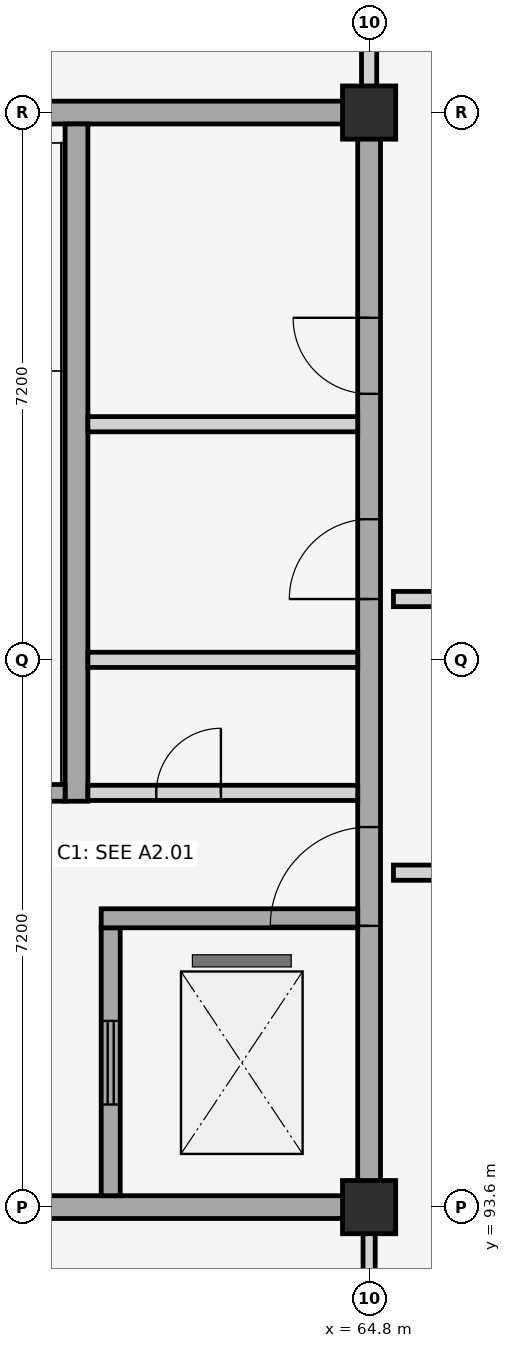
"""IFC4 building model, lengths in metres.
Left out: names, types, materials, properties, quantities, classifications, styles, units other than length and angle.
Written with IfcOpenShell. Run it as: python <this file> out.ifc"""

import sys

from ifc_helpers import new_model, si_unit, direction, frame, frame_2d, origin, origin_2d, place, context, subcontext, project, spatial, rectangle, extrude, element, fill, save


model = new_model("IFC4")
c1 = context("Model", 3, precision=1e-05, world=origin(), true_north=direction((0.0, 1.0)))
c2 = subcontext(c1, "Body", "Model", "MODEL_VIEW")
j1 = project(units=[si_unit("LENGTHUNIT", "METRE"), si_unit("PLANEANGLEUNIT", "RADIAN")], contexts=[c1])
p1 = place(None, origin())
s1 = spatial("IfcSite", under=j1, at=p1, CompositionType="ELEMENT")
p2 = place(p1, origin())
s2 = spatial("IfcBuilding", under=s1, at=p2, CompositionType="ELEMENT")
p3 = place(p2, frame((0.0, 0.0, -4.5)))
s3 = spatial("IfcBuildingStorey", under=s2, at=p3, CompositionType="ELEMENT", Elevation=-4.5)
for number, where, z_axis, x_axis in (
    (1, (64.8, 93.6, -0.45), (0.0, 0.0, 1.0), (1.0, 0.0, 0.0)),
    (2, (64.8, 108.0, -0.45), (0.0, 0.0, 1.0), (1.0, 0.0, 0.0)),
):
    element("IfcColumn", number, at=place(p3, frame(where, z_axis=z_axis, x_axis=x_axis)), inside=s3, PredefinedType="COLUMN", context=c2, shape_type="SweptSolid", body=[
        extrude(rectangle(XDim=0.7, YDim=0.7, at=origin_2d()), origin(), (0.0, 0.0, 1.0), 4.95),
    ])
for number, where, z_axis, x_axis in (
    (3, (57.8, 93.6, 0.0), (0.0, 0.0, 1.0), (1.0, 0.0, 0.0)),
    (4, (57.8, 108.0, 0.0), (0.0, 0.0, 1.0), (1.0, 0.0, 0.0)),
):
    element("IfcWall", number, at=place(p3, frame(where, z_axis=z_axis, x_axis=x_axis)), inside=s3, PredefinedType="SHEAR", context=c2, shape_type="SweptSolid", body=[
        extrude(rectangle(XDim=7.15, YDim=0.3, at=frame_2d((3.575, 0.0))), origin(), (0.0, 0.0, 1.0), 4.25),
    ])
p4 = place(p3, frame((64.8, 93.75, 0.0), z_axis=(0.0, 0.0, 1.0), x_axis=(0.0, 1.0, 0.0)))
e5 = element("IfcWall", 5, at=p4, inside=s3, PredefinedType="SHEAR", context=c2, shape_type="SweptSolid", body=[
    extrude(rectangle(XDim=14.1, YDim=0.3, at=frame_2d((7.05, 0.0))), origin(), (0.0, 0.0, 1.0), 4.25),
])
p5 = place(p4, frame((3.55, 0.0, 0.0)))
e6 = element("IfcOpeningElement", 6, at=p5, cuts=e5, PredefinedType="OPENING", context=c2, shape_type="SweptSolid", body=[
    extrude(rectangle(XDim=1.3, YDim=2.2, at=frame_2d((0.65, 1.1))), frame((0.0, 0.16, 0.0), z_axis=(0.0, -1.0, 0.0), x_axis=(1.0, 0.0, 0.0)), (0.0, 0.0, 1.0), 0.32),
])
p6 = place(p4, frame((7.85, 0.0, 0.0)))
e7 = element("IfcOpeningElement", 7, at=p6, cuts=e5, PredefinedType="OPENING", context=c2, shape_type="SweptSolid", body=[
    extrude(rectangle(XDim=1.05, YDim=2.15, at=frame_2d((0.525, 1.075))), frame((0.0, 0.16, 0.0), z_axis=(0.0, -1.0, 0.0), x_axis=(1.0, 0.0, 0.0)), (0.0, 0.0, 1.0), 0.32),
])
p7 = place(p4, frame((10.55, 0.0, 0.0)))
e8 = element("IfcOpeningElement", 8, at=p7, cuts=e5, PredefinedType="OPENING", context=c2, shape_type="SweptSolid", body=[
    extrude(rectangle(XDim=1.0, YDim=2.15, at=frame_2d((0.5, 1.075))), frame((0.0, 0.16, 0.0), z_axis=(0.0, -1.0, 0.0), x_axis=(1.0, 0.0, 0.0)), (0.0, 0.0, 1.0), 0.32),
])
p8 = place(p3, frame((61.4, 93.75, 0.0), z_axis=(0.0, 0.0, 1.0), x_axis=(0.0, 1.0, 0.0)))
e9 = element("IfcWall", 9, at=p8, inside=s3, PredefinedType="SHEAR", context=c2, shape_type="SweptSolid", body=[
    extrude(rectangle(XDim=3.525, YDim=0.25, at=frame_2d((1.762, 0.0))), origin(), (0.0, 0.0, 1.0), 4.25),
])
p9 = place(p8, frame((1.2, 0.0, 0.0)))
e10 = element("IfcOpeningElement", 10, at=p9, cuts=e9, PredefinedType="OPENING", context=c2, shape_type="SweptSolid", body=[
    extrude(rectangle(XDim=1.1, YDim=2.15, at=frame_2d((0.55, 1.075))), frame((0.0, 0.135, 0.0), z_axis=(0.0, -1.0, 0.0), x_axis=(1.0, 0.0, 0.0)), (0.0, 0.0, 1.0), 0.27),
])
p10 = place(p3, frame((60.95, 98.94, 0.0), z_axis=(0.0, 0.0, 1.0), x_axis=(0.0, 1.0, 0.0)))
e11 = element("IfcWall", 11, at=p10, inside=s3, PredefinedType="SHEAR", context=c2, shape_type="SweptSolid", body=[
    extrude(rectangle(XDim=8.91, YDim=0.3, at=frame_2d((4.455, 0.0))), origin(), (0.0, 0.0, 1.0), 4.25),
])
p11 = place(p3, frame((61.1, 99.05, 0.0), z_axis=(0.0, 0.0, 1.0), x_axis=(1.0, 0.0, 0.0)))
e12 = element("IfcWall", 12, at=p11, inside=s3, PredefinedType="PLUMBINGWALL", context=c2, shape_type="SweptSolid", body=[
    extrude(rectangle(XDim=3.55, YDim=0.2, at=frame_2d((1.775, 0.0))), origin(), (0.0, 0.0, 1.0), 3.67),
])
p12 = place(p11, frame((0.9, 0.0, 0.0)))
e13 = element("IfcOpeningElement", 13, at=p12, cuts=e12, PredefinedType="OPENING", context=c2, shape_type="SweptSolid", body=[
    extrude(rectangle(XDim=0.85, YDim=2.05, at=frame_2d((0.425, 1.025))), frame((0.0, 0.11, 0.0), z_axis=(0.0, -1.0, 0.0), x_axis=(1.0, 0.0, 0.0)), (0.0, 0.0, 1.0), 0.22),
])
p13 = place(p3, frame((57.8, 99.05, 0.0), z_axis=(0.0, 0.0, 1.0), x_axis=(1.0, 0.0, 0.0)))
e14 = element("IfcWall", 14, at=p13, inside=s3, PredefinedType="SHEAR", context=c2, shape_type="SweptSolid", body=[
    extrude(rectangle(XDim=3.0, YDim=0.22, at=frame_2d((1.5, 0.0))), origin(), (0.0, 0.0, 1.0), 4.25),
])
p14 = place(p13, frame((0.75, 0.0, 0.0)))
e15 = element("IfcOpeningElement", 15, at=p14, cuts=e14, PredefinedType="OPENING", context=c2, shape_type="SweptSolid", body=[
    extrude(rectangle(XDim=1.3, YDim=2.2, at=frame_2d((0.65, 1.1))), frame((0.0, 0.12, 0.0), z_axis=(0.0, -1.0, 0.0), x_axis=(1.0, 0.0, 0.0)), (0.0, 0.0, 1.0), 0.24),
])
p15 = place(p3, frame((61.275, 97.4, 0.0), z_axis=(0.0, 0.0, 1.0), x_axis=(1.0, 0.0, 0.0)))
e16 = element("IfcWall", 16, at=p15, inside=s3, PredefinedType="SHEAR", context=c2, shape_type="SweptSolid", body=[
    extrude(rectangle(XDim=3.375, YDim=0.25, at=frame_2d((1.688, 0.0))), origin(), (0.0, 0.0, 1.0), 4.25),
])
for number, where, z_axis, x_axis in (
    (17, (61.1, 100.8, 0.0), (0.0, 0.0, 1.0), (1.0, 0.0, 0.0)),
    (18, (61.1, 103.9, 0.0), (0.0, 0.0, 1.0), (1.0, 0.0, 0.0)),
):
    element("IfcWall", number, at=place(p3, frame(where, z_axis=z_axis, x_axis=x_axis)), inside=s3, PredefinedType="PLUMBINGWALL", context=c2, shape_type="SweptSolid", body=[
        extrude(rectangle(XDim=3.55, YDim=0.2, at=frame_2d((1.775, 0.0))), origin(), (0.0, 0.0, 1.0), 3.67),
    ])
p16 = place(p3, frame((65.12, 98.0, 0.0), z_axis=(0.0, 0.0, 1.0), x_axis=(1.0, 0.0, 0.0)))
e19 = element("IfcWall", 19, at=p16, inside=s3, PredefinedType="PARTITIONING", context=c2, shape_type="SweptSolid", body=[
    extrude(rectangle(XDim=20.96, YDim=0.2, at=frame_2d((10.48, 0.0))), origin(), (0.0, 0.0, 1.0), 3.45),
])
p17 = place(p16, frame((9.68, 0.0, 0.0)))
e20 = element("IfcOpeningElement", 20, at=p17, cuts=e19, PredefinedType="OPENING", context=c2, shape_type="SweptSolid", body=[
    extrude(rectangle(XDim=1.6, YDim=2.35, at=frame_2d((0.8, 1.175))), frame((0.0, 0.11, 0.0), z_axis=(0.0, -1.0, 0.0), x_axis=(1.0, 0.0, 0.0)), (0.0, 0.0, 1.0), 0.22),
])
p18 = place(p3, frame((65.12, 101.6, 0.0), z_axis=(0.0, 0.0, 1.0), x_axis=(1.0, 0.0, 0.0)))
e21 = element("IfcWall", 21, at=p18, inside=s3, PredefinedType="PARTITIONING", context=c2, shape_type="SweptSolid", body=[
    extrude(rectangle(XDim=20.96, YDim=0.2, at=frame_2d((10.48, 0.0))), origin(), (0.0, 0.0, 1.0), 3.45),
])
p19 = place(p18, frame((9.58, 0.0, 0.0)))
e22 = element("IfcOpeningElement", 22, at=p19, cuts=e21, PredefinedType="OPENING", context=c2, shape_type="SweptSolid", body=[
    extrude(rectangle(XDim=1.8, YDim=2.4, at=frame_2d((0.9, 1.2))), frame((0.0, 0.11, 0.0), z_axis=(0.0, -1.0, 0.0), x_axis=(1.0, 0.0, 0.0)), (0.0, 0.0, 1.0), 0.22),
])
p20 = place(p3, frame((64.8, 86.72, 0.0), z_axis=(0.0, 0.0, 1.0), x_axis=(0.0, 1.0, 0.0)))
e23 = element("IfcWall", 23, at=p20, inside=s3, PredefinedType="PARTITIONING", context=c2, shape_type="SweptSolid", body=[
    extrude(rectangle(XDim=6.56, YDim=0.16, at=frame_2d((3.28, 0.0))), origin(), (0.0, 0.0, 1.0), 3.45),
])
p21 = place(p20, frame((2.43, 0.0, 0.0)))
e24 = element("IfcOpeningElement", 24, at=p21, cuts=e23, PredefinedType="OPENING", context=c2, shape_type="SweptSolid", body=[
    extrude(rectangle(XDim=1.7, YDim=2.4, at=frame_2d((0.85, 1.2))), frame((0.0, 0.09, 0.0), z_axis=(0.0, -1.0, 0.0), x_axis=(1.0, 0.0, 0.0)), (0.0, 0.0, 1.0), 0.18),
])
p22 = place(p3, frame((64.8, 108.32, 0.0), z_axis=(0.0, 0.0, 1.0), x_axis=(0.0, 1.0, 0.0)))
e25 = element("IfcWall", 25, at=p22, inside=s3, PredefinedType="PARTITIONING", context=c2, shape_type="SweptSolid", body=[
    extrude(rectangle(XDim=6.56, YDim=0.2, at=frame_2d((3.28, 0.0))), origin(), (0.0, 0.0, 1.0), 3.45),
])
p23 = place(p22, frame((2.38, 0.0, 0.0)))
e26 = element("IfcOpeningElement", 26, at=p23, cuts=e25, PredefinedType="OPENING", context=c2, shape_type="SweptSolid", body=[
    extrude(rectangle(XDim=1.8, YDim=2.4, at=frame_2d((0.9, 1.2))), frame((0.0, 0.11, 0.0), z_axis=(0.0, -1.0, 0.0), x_axis=(1.0, 0.0, 0.0)), (0.0, 0.0, 1.0), 0.22),
])
p24 = place(p5, origin())
e27 = element("IfcDoor", 27, at=p24, inside=s3, OperationType="SINGLE_SWING_LEFT", PredefinedType="DOOR", context=c2, shape_type="SweptSolid", body=[
    extrude(rectangle(XDim=1.3, YDim=2.2, at=frame_2d((0.65, 1.1))), frame((0.0, 0.025, 0.0), z_axis=(0.0, -1.0, 0.0), x_axis=(1.0, 0.0, 0.0)), (0.0, 0.0, 1.0), 0.05),
])
fill(e6, e27)
p25 = place(p6, origin())
e28 = element("IfcDoor", 28, at=p25, inside=s3, OperationType="SINGLE_SWING_LEFT", PredefinedType="DOOR", context=c2, shape_type="SweptSolid", body=[
    extrude(rectangle(XDim=1.05, YDim=2.15, at=frame_2d((0.525, 1.075))), frame((0.0, 0.025, 0.0), z_axis=(0.0, -1.0, 0.0), x_axis=(1.0, 0.0, 0.0)), (0.0, 0.0, 1.0), 0.05),
])
fill(e7, e28)
p26 = place(p7, origin())
e29 = element("IfcDoor", 29, at=p26, inside=s3, OperationType="SINGLE_SWING_RIGHT", PredefinedType="DOOR", context=c2, shape_type="SweptSolid", body=[
    extrude(rectangle(XDim=1.0, YDim=2.15, at=frame_2d((0.5, 1.075))), frame((0.0, 0.025, 0.0), z_axis=(0.0, -1.0, 0.0), x_axis=(1.0, 0.0, 0.0)), (0.0, 0.0, 1.0), 0.05),
])
fill(e8, e29)
p27 = place(p9, origin())
e30 = element("IfcDoor", 30, at=p27, inside=s3, OperationType="SLIDING_TO_LEFT", PredefinedType="DOOR", context=c2, shape_type="SweptSolid", body=[
    extrude(rectangle(XDim=1.1, YDim=2.15, at=frame_2d((0.55, 1.075))), frame((0.0, 0.025, 0.0), z_axis=(0.0, -1.0, 0.0), x_axis=(1.0, 0.0, 0.0)), (0.0, 0.0, 1.0), 0.05),
])
fill(e10, e30)
p28 = place(p12, origin())
e31 = element("IfcDoor", 31, at=p28, inside=s3, OperationType="SINGLE_SWING_RIGHT", PredefinedType="TRAPDOOR", context=c2, shape_type="SweptSolid", body=[
    extrude(rectangle(XDim=0.85, YDim=2.05, at=frame_2d((0.425, 1.025))), frame((0.0, 0.025, 0.0), z_axis=(0.0, -1.0, 0.0), x_axis=(1.0, 0.0, 0.0)), (0.0, 0.0, 1.0), 0.05),
])
fill(e13, e31)
save(model, sys.argv[1])
